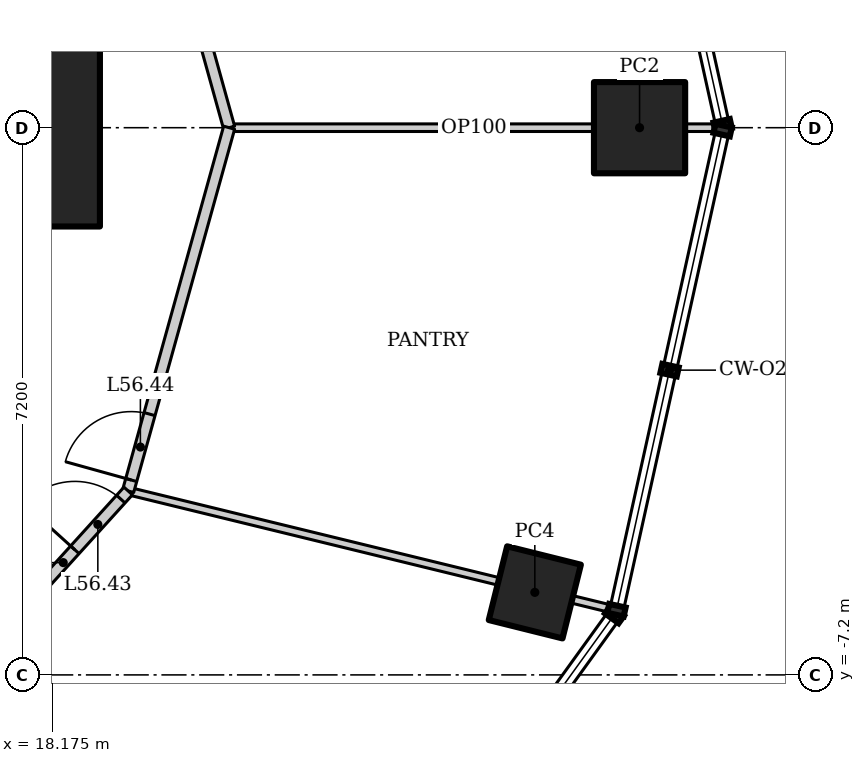
"""IFC4 building model, lengths in metres.
Left out: names, types, materials, properties, quantities, classifications, styles, units other than length and angle.
Written with IfcOpenShell. Run it as: python <this file> out.ifc"""

import sys

from ifc_helpers import new_model, si_unit, direction, frame, frame_2d, origin, origin_2d, place, context, subcontext, project, spatial, rectangle, hollow_rectangle, extrude, element, fill, save


model = new_model("IFC4")
c1 = context("Model", 3, precision=1e-05, world=origin(), true_north=direction((0.0, 1.0)))
c2 = subcontext(c1, "Body", "Model", "MODEL_VIEW")
j1 = project(units=[si_unit("LENGTHUNIT", "METRE"), si_unit("PLANEANGLEUNIT", "RADIAN")], contexts=[c1])
p1 = place(None, origin())
s1 = spatial("IfcSite", under=j1, at=p1, CompositionType="ELEMENT")
p2 = place(p1, origin())
s2 = spatial("IfcBuilding", under=s1, at=p2, CompositionType="ELEMENT")
p3 = place(p2, frame((0.0, 0.0, 241.0)))
s3 = spatial("IfcBuildingStorey", under=s2, at=p3, CompositionType="ELEMENT", Elevation=241.0)
p4 = place(p3, frame((17.5, 0.0, 0.0), z_axis=(0.0, 0.0, 1.0), x_axis=(1.0, 0.0, 0.0)))
e1 = element("IfcColumn", 1, at=p4, inside=s3, PredefinedType="COLUMN", context=c2, shape_type="SweptSolid", body=[
    extrude(hollow_rectangle(XDim=2.6, YDim=2.6, WallThickness=0.13, at=origin_2d()), origin(), (0.0, 0.0, 1.0), 4.2),
])
p5 = place(p3, frame((25.9, 0.0, 0.0), z_axis=(0.0, 0.0, 1.0), x_axis=(1.0, 0.0, 0.0)))
e2 = element("IfcColumn", 2, at=p5, inside=s3, PredefinedType="COLUMN", context=c2, shape_type="SweptSolid", body=[
    extrude(hollow_rectangle(XDim=1.2, YDim=1.2, WallThickness=0.1, at=origin_2d()), origin(), (0.0, 0.0, 1.0), 4.2),
])
p6 = place(p3, frame((24.522, -6.114, 0.0), z_axis=(0.0, 0.0, 1.0), x_axis=(0.2419218956, 0.970295726276, 0.0)))
e3 = element("IfcColumn", 3, at=p6, inside=s3, PredefinedType="COLUMN", context=c2, shape_type="SweptSolid", body=[
    extrude(hollow_rectangle(XDim=1.0, YDim=1.0, WallThickness=0.08, at=origin_2d()), origin(), (0.0, 0.0, 1.0), 4.2),
])
p7 = place(p3, frame((26.944, 0.0, 0.0), z_axis=(0.0, 0.0, 1.0), x_axis=(-1.0, 0.0, 0.0)))
e4 = element("IfcWall", 4, at=p7, inside=s3, PredefinedType="PARTITIONING", context=c2, shape_type="SweptSolid", body=[
    extrude(rectangle(XDim=6.444, YDim=0.1, at=frame_2d((3.222, 0.0))), origin(), (0.0, 0.0, 1.0), 3.349),
])
p8 = place(p3, frame((25.543, -6.335, 0.0), z_axis=(0.0, 0.0, 1.0), x_axis=(-0.971467850621, 0.237171278215, 0.0)))
e5 = element("IfcWall", 5, at=p8, inside=s3, PredefinedType="PARTITIONING", context=c2, shape_type="SweptSolid", body=[
    extrude(rectangle(XDim=6.558, YDim=0.1, at=frame_2d((3.279, 0.0))), origin(), (0.0, 0.0, 1.0), 3.108),
])
p9 = place(p3, frame((20.5, 0.0, 0.0), z_axis=(0.0, 0.0, 1.0), x_axis=(-0.26770731566, 0.963500281859, 0.0)))
e6 = element("IfcWall", 6, at=p9, inside=s3, PredefinedType="PARTITIONING", context=c2, shape_type="SweptSolid", body=[
    extrude(rectangle(XDim=4.961, YDim=0.15, at=frame_2d((2.48, 0.0))), origin(), (0.0, 0.0, 1.0), 4.05),
])
p10 = place(p3, frame((19.172, -4.78, 0.0), z_axis=(0.0, 0.0, 1.0), x_axis=(0.26770731566, 0.963500281859, 0.0)))
e7 = element("IfcWall", 7, at=p10, inside=s3, PredefinedType="PARTITIONING", context=c2, shape_type="SweptSolid", body=[
    extrude(rectangle(XDim=4.961, YDim=0.15, at=frame_2d((2.48, 0.0))), origin(), (0.0, 0.0, 1.0), 4.05),
])
p11 = place(p10, frame((0.15, 0.0, 0.0)))
e8 = element("IfcOpeningElement", 8, at=p11, cuts=e7, PredefinedType="OPENING", context=c2, shape_type="SweptSolid", body=[
    extrude(rectangle(XDim=0.9, YDim=2.1, at=frame_2d((0.45, 1.05))), frame((0.0, 0.085, 0.0), z_axis=(0.0, -1.0, 0.0), x_axis=(1.0, 0.0, 0.0)), (0.0, 0.0, 1.0), 0.17),
])
p12 = place(p3, frame((17.463, -6.665, 0.0), z_axis=(0.0, 0.0, 1.0), x_axis=(0.671721890643, 0.74080341632, 0.0)))
e9 = element("IfcWall", 9, at=p12, inside=s3, PredefinedType="PARTITIONING", context=c2, shape_type="SweptSolid", body=[
    extrude(rectangle(XDim=2.544, YDim=0.15, at=frame_2d((1.272, 0.0))), origin(), (0.0, 0.0, 1.0), 4.05),
])
p13 = place(p12, frame((1.5, 0.0, 0.0)))
e10 = element("IfcOpeningElement", 10, at=p13, cuts=e9, PredefinedType="OPENING", context=c2, shape_type="SweptSolid", body=[
    extrude(rectangle(XDim=0.9, YDim=2.1, at=frame_2d((0.45, 1.05))), frame((0.0, 0.085, 0.0), z_axis=(0.0, -1.0, 0.0), x_axis=(1.0, 0.0, 0.0)), (0.0, 0.0, 1.0), 0.17),
])
p14 = place(p13, origin())
e11 = element("IfcDoor", 11, at=p14, inside=s3, OperationType="SINGLE_SWING_LEFT", PredefinedType="DOOR", context=c2, shape_type="SweptSolid", body=[
    extrude(rectangle(XDim=0.9, YDim=2.1, at=frame_2d((0.45, 1.05))), frame((0.0, 0.025, 0.0), z_axis=(0.0, -1.0, 0.0), x_axis=(1.0, 0.0, 0.0)), (0.0, 0.0, 1.0), 0.05),
])
fill(e10, e11)
p15 = place(p11, origin())
e12 = element("IfcDoor", 12, at=p15, inside=s3, OperationType="SINGLE_SWING_LEFT", PredefinedType="DOOR", context=c2, shape_type="SweptSolid", body=[
    extrude(rectangle(XDim=0.9, YDim=2.1, at=frame_2d((0.45, 1.05))), frame((0.0, 0.025, 0.0), z_axis=(0.0, -1.0, 0.0), x_axis=(1.0, 0.0, 0.0)), (0.0, 0.0, 1.0), 0.05),
])
fill(e8, e12)
save(model, sys.argv[1])
